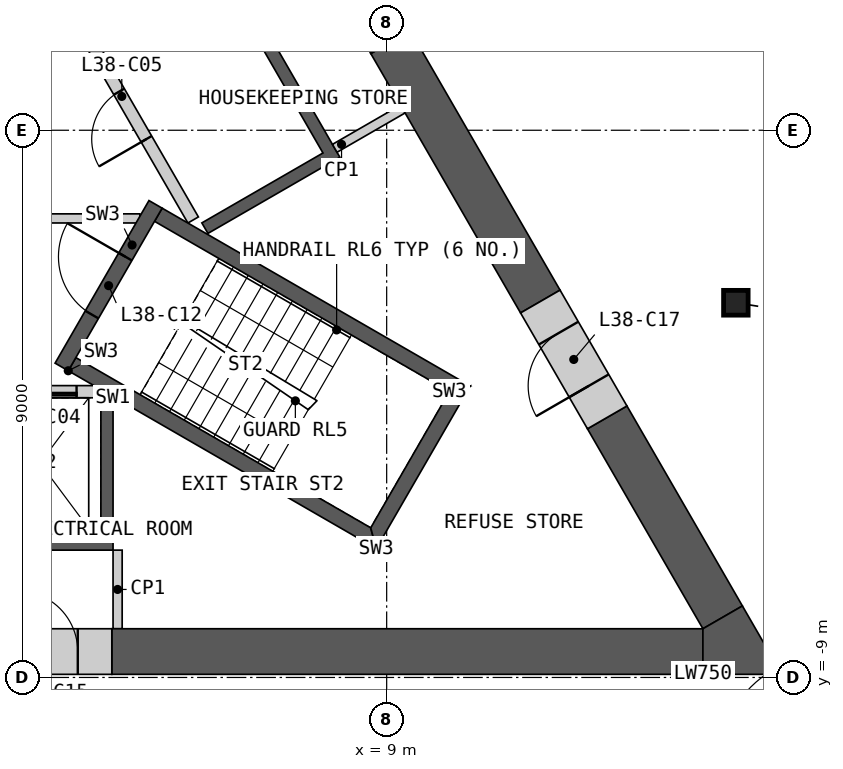
"""IFC4 building model, lengths in metres.
Left out: names, types, materials, properties, quantities, classifications, styles, units other than length and angle.
Written with IfcOpenShell. Run it as: python <this file> out.ifc"""

import sys

from ifc_helpers import new_model, si_unit, direction, frame, frame_2d, origin, origin_2d, place, context, subcontext, project, spatial, polyline, rectangle, i_section, outline, extrude, element, fill, save


model = new_model("IFC4")
c1 = context("Model", 3, precision=1e-05, world=origin(), true_north=direction((0.0, 1.0)))
c2 = subcontext(c1, "Body", "Model", "MODEL_VIEW")
j1 = project(units=[si_unit("LENGTHUNIT", "METRE"), si_unit("PLANEANGLEUNIT", "RADIAN")], contexts=[c1])
p1 = place(None, origin())
s1 = spatial("IfcSite", under=j1, at=p1, CompositionType="ELEMENT")
p2 = place(p1, origin())
s2 = spatial("IfcBuilding", under=s1, at=p2, CompositionType="ELEMENT")
p3 = place(p2, frame((0.0, 0.0, 180.0)))
s3 = spatial("IfcBuildingStorey", under=s2, at=p3, CompositionType="ELEMENT", Elevation=180.0)
p4 = place(p3, frame((14.743, -2.837, 0.0), z_axis=(0.0, 0.0, 1.0), x_axis=(1.0, 0.0, 0.0)))
e1 = element("IfcColumn", 1, at=p4, inside=s3, PredefinedType="COLUMN", context=c2, shape_type="SweptSolid", body=[
    extrude(i_section(OverallWidth=0.404, OverallDepth=0.407, WebThickness=0.027, FlangeThickness=0.044, at=origin_2d()), origin(), (0.0, 0.0, 1.0), 3.6),
])
p5 = place(p3, origin())
e2 = element("IfcWall", 2, at=p5, inside=s3, PredefinedType="SHEAR", context=c2, shape_type="SweptSolid", body=[
    extrude(outline(polyline([(4.5, -4.4), (4.5, -6.906), (2.1, -6.906), (2.1, -4.4), (2.3, -4.4), (2.3, -6.7), (4.3, -6.7), (4.3, -4.4), (4.5, -4.4)])), origin(), (0.0, 0.0, 1.0), 3.25),
])
p6 = place(p3, frame((-4.187, -4.3, 0.0), z_axis=(0.0, 0.0, 1.0), x_axis=(1.0, 0.0, 0.0)))
e3 = element("IfcWall", 3, at=p6, inside=s3, PredefinedType="SOLIDWALL", context=c2, shape_type="SweptSolid", body=[
    extrude(rectangle(XDim=8.373, YDim=0.2, at=frame_2d((4.187, 0.0))), origin(), (0.0, 0.0, 1.0), 3.25),
])
p7 = place(p6, frame((0.287, 0.0, 0.0)))
e4 = element("IfcOpeningElement", 4, at=p7, cuts=e3, PredefinedType="OPENING", context=c2, shape_type="SweptSolid", body=[
    extrude(rectangle(XDim=1.2, YDim=2.1, at=frame_2d((0.6, 1.05))), frame((0.0, 0.11, 0.0), z_axis=(0.0, -1.0, 0.0), x_axis=(1.0, 0.0, 0.0)), (0.0, 0.0, 1.0), 0.22),
])
p8 = place(p6, frame((2.387, 0.0, 0.0)))
e5 = element("IfcOpeningElement", 5, at=p8, cuts=e3, PredefinedType="OPENING", context=c2, shape_type="SweptSolid", body=[
    extrude(rectangle(XDim=1.4, YDim=2.1, at=frame_2d((0.7, 1.05))), frame((0.0, 0.11, 0.0), z_axis=(0.0, -1.0, 0.0), x_axis=(1.0, 0.0, 0.0)), (0.0, 0.0, 1.0), 0.22),
])
p9 = place(p6, frame((4.837, 0.0, 0.0)))
e6 = element("IfcOpeningElement", 6, at=p9, cuts=e3, PredefinedType="OPENING", context=c2, shape_type="SweptSolid", body=[
    extrude(rectangle(XDim=0.9, YDim=2.1, at=frame_2d((0.45, 1.05))), frame((0.0, 0.11, 0.0), z_axis=(0.0, -1.0, 0.0), x_axis=(1.0, 0.0, 0.0)), (0.0, 0.0, 1.0), 0.22),
])
p10 = place(p6, frame((6.887, 0.0, 0.0)))
e7 = element("IfcOpeningElement", 7, at=p10, cuts=e3, PredefinedType="OPENING", context=c2, shape_type="SweptSolid", body=[
    extrude(rectangle(XDim=1.2, YDim=2.1, at=frame_2d((0.6, 1.05))), frame((0.0, 0.11, 0.0), z_axis=(0.0, -1.0, 0.0), x_axis=(1.0, 0.0, 0.0)), (0.0, 0.0, 1.0), 0.22),
])
p11 = place(p3, origin())
e8 = element("IfcWall", 8, at=p11, inside=s3, PredefinedType="SHEAR", context=c2, shape_type="SweptSolid", body=[
    extrude(outline(polyline([(3.76, 2.287), (5.931, 3.54), (8.231, -0.444), (6.061, -1.697), (5.96, -1.524), (7.952, -0.374), (5.852, 3.263), (3.861, 2.113), (3.76, 2.287)])), origin(), (0.0, 0.0, 1.0), 3.25),
])
p12 = place(p3, frame((5.817, -1.476, 0.0), z_axis=(0.0, 0.0, 1.0), x_axis=(-0.500002616675, 0.866023893041, 0.0)))
e9 = element("IfcWall", 9, at=p12, inside=s3, PredefinedType="SOLIDWALL", context=c2, shape_type="SweptSolid", body=[
    extrude(rectangle(XDim=8.373, YDim=0.2, at=frame_2d((4.187, 0.0))), origin(), (0.0, 0.0, 1.0), 3.25),
])
p13 = place(p12, frame((1.537, 0.0, 0.0)))
e10 = element("IfcOpeningElement", 10, at=p13, cuts=e9, PredefinedType="OPENING", context=c2, shape_type="SweptSolid", body=[
    extrude(rectangle(XDim=0.9, YDim=2.1, at=frame_2d((0.45, 1.05))), frame((0.0, 0.11, 0.0), z_axis=(0.0, -1.0, 0.0), x_axis=(1.0, 0.0, 0.0)), (0.0, 0.0, 1.0), 0.22),
])
p14 = place(p12, frame((4.837, 0.0, 0.0)))
e11 = element("IfcOpeningElement", 11, at=p14, cuts=e9, PredefinedType="OPENING", context=c2, shape_type="SweptSolid", body=[
    extrude(rectangle(XDim=0.9, YDim=2.1, at=frame_2d((0.45, 1.05))), frame((0.0, 0.11, 0.0), z_axis=(0.0, -1.0, 0.0), x_axis=(1.0, 0.0, 0.0)), (0.0, 0.0, 1.0), 0.22),
])
p15 = place(p12, frame((6.937, 0.0, 0.0)))
e12 = element("IfcOpeningElement", 12, at=p15, cuts=e9, PredefinedType="OPENING", context=c2, shape_type="SweptSolid", body=[
    extrude(rectangle(XDim=1.1, YDim=2.1, at=frame_2d((0.55, 1.05))), frame((0.0, 0.11, 0.0), z_axis=(0.0, -1.0, 0.0), x_axis=(1.0, 0.0, 0.0)), (0.0, 0.0, 1.0), 0.22),
])
p16 = place(p3, frame((-4.941, -1.45, 0.0), z_axis=(0.0, 0.0, 1.0), x_axis=(1.0, 0.0, 0.0)))
e13 = element("IfcWall", 13, at=p16, inside=s3, PredefinedType="PARTITIONING", context=c2, shape_type="SweptSolid", body=[
    extrude(rectangle(XDim=9.882, YDim=0.15, at=frame_2d((4.941, 0.0))), origin(), (0.0, 0.0, 1.0), 3.25),
])
p17 = place(p16, frame((4.391, 0.0, 0.0)))
e14 = element("IfcOpeningElement", 14, at=p17, cuts=e13, PredefinedType="OPENING", context=c2, shape_type="SweptSolid", body=[
    extrude(rectangle(XDim=1.1, YDim=2.1, at=frame_2d((0.55, 1.05))), frame((0.0, 0.085, 0.0), z_axis=(0.0, -1.0, 0.0), x_axis=(1.0, 0.0, 0.0)), (0.0, 0.0, 1.0), 0.17),
])
p18 = place(p3, origin())
e15 = element("IfcWall", 15, at=p18, inside=s3, PredefinedType="SHEAR", context=c2, shape_type="SweptSolid", body=[
    extrude(outline(polyline([(3.763, -3.956), (8.83, -6.881), (8.738, -6.539), (3.888, -3.739), (3.763, -3.956)])), origin(), (0.0, 0.0, 1.0), 3.25),
])
p19 = place(p3, origin())
e16 = element("IfcWall", 16, at=p19, inside=s3, PredefinedType="SHEAR", context=c2, shape_type="SweptSolid", body=[
    extrude(outline(polyline([(8.83, -6.881), (10.374, -4.206), (10.032, -4.298), (8.738, -6.539), (8.83, -6.881)])), origin(), (0.0, 0.0, 1.0), 3.25),
])
p20 = place(p3, origin())
e17 = element("IfcWall", 17, at=p20, inside=s3, PredefinedType="SHEAR", context=c2, shape_type="SweptSolid", body=[
    extrude(outline(polyline([(10.032, -4.298), (10.374, -4.206), (5.307, -1.281), (5.182, -1.498), (10.032, -4.298)])), origin(), (0.0, 0.0, 1.0), 3.25),
])
p21 = place(p3, frame((3.655, -3.893, 0.0), z_axis=(0.0, 0.0, 1.0), x_axis=(0.499982516597, 0.866035497597, 0.0)))
e18 = element("IfcWall", 18, at=p21, inside=s3, PredefinedType="SHEAR", context=c2, shape_type="SweptSolid", body=[
    extrude(rectangle(XDim=3.088, YDim=0.25, at=frame_2d((1.544, 0.0))), origin(), (0.0, 0.0, 1.0), 3.25),
])
p22 = place(p21, frame((0.994, 0.0, 0.0)))
e19 = element("IfcOpeningElement", 19, at=p22, cuts=e18, PredefinedType="OPENING", context=c2, shape_type="SweptSolid", body=[
    extrude(rectangle(XDim=1.1, YDim=2.1, at=frame_2d((0.55, 1.05))), frame((0.0, 0.135, 0.0), z_axis=(0.0, -1.0, 0.0), x_axis=(1.0, 0.0, 0.0)), (0.0, 0.0, 1.0), 0.27),
])
for number, where, z_axis, x_axis in (
    (20, (4.575, -6.906, 0.0), (0.0, 0.0, 1.0), (0.0, -1.0, 0.0)),
    (21, (9.266, 0.349, 0.0), (0.0, 0.0, 1.0), (-0.866, -0.5, 0.0)),
):
    element("IfcWall", number, at=place(p3, frame(where, z_axis=z_axis, x_axis=x_axis)), inside=s3, PredefinedType="PARTITIONING", context=c2, shape_type="SweptSolid", body=[
        extrude(rectangle(XDim=1.293, YDim=0.15, at=frame_2d((0.646, 0.0))), origin(), (0.0, 0.0, 1.0), 3.25),
    ])
p23 = place(p3, frame((4.48, -8.574, 0.0), z_axis=(0.0, 0.0, 1.0), x_axis=(1.0, 0.0, 0.0)))
e22 = element("IfcWall", 22, at=p23, inside=s3, PredefinedType="SHEAR", context=c2, shape_type="SweptSolid", body=[
    extrude(rectangle(XDim=9.721, YDim=0.75, at=frame_2d((4.86, 0.0))), origin(), (0.0, 0.0, 1.0), 3.25),
])
p24 = place(p3, frame((11.527, -2.817, 0.0), z_axis=(0.0, 0.0, 1.0), x_axis=(-0.50001992892, 0.866013897511, 0.0)))
e23 = element("IfcWall", 23, at=p24, inside=s3, PredefinedType="SHEAR", context=c2, shape_type="SweptSolid", body=[
    extrude(rectangle(XDim=4.926, YDim=0.75, at=frame_2d((2.463, 0.0))), origin(), (0.0, 0.0, 1.0), 3.25),
])
p25 = place(p3, frame((14.526, -8.011, 0.0), z_axis=(0.0, 0.0, 1.0), x_axis=(-0.499996970966, 0.866027152591, 0.0)))
e24 = element("IfcWall", 24, at=p25, inside=s3, PredefinedType="SHEAR", context=c2, shape_type="SweptSolid", body=[
    extrude(rectangle(XDim=3.798, YDim=0.75, at=frame_2d((1.899, 0.0))), origin(), (0.0, 0.0, 1.0), 3.25),
])
p26 = place(p3, origin())
e25 = element("IfcWall", 25, at=p26, inside=s3, PredefinedType="SHEAR", context=c2, shape_type="SweptSolid", body=[
    extrude(outline(polyline([(14.201, -8.949), (14.201, -8.199), (14.851, -7.824), (15.5, -8.949), (14.201, -8.949)])), origin(), (0.0, 0.0, 1.0), 3.25),
])
p27 = place(p3, frame((2.32, -8.574, 0.0), z_axis=(0.0, 0.0, 1.0), x_axis=(1.0, 0.0, 0.0)))
e26 = element("IfcWall", 26, at=p27, inside=s3, PredefinedType="SHEAR", context=c2, shape_type="SweptSolid", body=[
    extrude(rectangle(XDim=2.16, YDim=0.75, at=frame_2d((1.08, 0.0))), origin(), (0.0, 0.0, 1.0), 3.25),
])
p28 = place(p27, frame((0.6, 0.0, 0.0)))
e27 = element("IfcOpeningElement", 27, at=p28, cuts=e26, PredefinedType="OPENING", context=c2, shape_type="SweptSolid", body=[
    extrude(rectangle(XDim=1.0, YDim=2.1, at=frame_2d((0.5, 1.05))), frame((0.0, 0.385, 0.0), z_axis=(0.0, -1.0, 0.0), x_axis=(1.0, 0.0, 0.0)), (0.0, 0.0, 1.0), 0.77),
])
p29 = place(p3, frame((12.627, -4.722, 0.0), z_axis=(0.0, 0.0, 1.0), x_axis=(-0.499946605688, 0.86605622881, 0.0)))
e28 = element("IfcWall", 28, at=p29, inside=s3, PredefinedType="SHEAR", context=c2, shape_type="SweptSolid", body=[
    extrude(rectangle(XDim=2.2, YDim=0.75, at=frame_2d((1.1, 0.0))), origin(), (0.0, 0.0, 1.0), 3.25),
])
p30 = place(p29, frame((0.6, 0.0, 0.0)))
e29 = element("IfcOpeningElement", 29, at=p30, cuts=e28, PredefinedType="OPENING", context=c2, shape_type="SweptSolid", body=[
    extrude(rectangle(XDim=1.0, YDim=2.1, at=frame_2d((0.5, 1.05))), frame((0.0, 0.385, 0.0), z_axis=(0.0, -1.0, 0.0), x_axis=(1.0, 0.0, 0.0)), (0.0, 0.0, 1.0), 0.77),
])
p31 = place(p3, frame((9.064, 1.448, 0.0), z_axis=(0.0, 0.0, 1.0), x_axis=(-0.50002983664, 0.866008176907, 0.0)))
e30 = element("IfcWall", 30, at=p31, inside=s3, PredefinedType="SHEAR", context=c2, shape_type="SweptSolid", body=[
    extrude(rectangle(XDim=2.2, YDim=0.75, at=frame_2d((1.1, 0.0))), origin(), (0.0, 0.0, 1.0), 3.25),
])
p32 = place(p31, frame((0.6, 0.0, 0.0)))
e31 = element("IfcOpeningElement", 31, at=p32, cuts=e30, PredefinedType="OPENING", context=c2, shape_type="SweptSolid", body=[
    extrude(rectangle(XDim=1.0, YDim=2.1, at=frame_2d((0.5, 1.05))), frame((0.0, 0.385, 0.0), z_axis=(0.0, -1.0, 0.0), x_axis=(1.0, 0.0, 0.0)), (0.0, 0.0, 1.0), 0.77),
])
p33 = place(p3, frame((5.377, 19.385, 0.0), z_axis=(0.0, 0.0, 1.0), x_axis=(0.500000757641, -0.86602496636, 0.0)))
e32 = element("IfcWall", 32, at=p33, inside=s3, PredefinedType="PARTITIONING", context=c2, shape_type="SweptSolid", body=[
    extrude(rectangle(XDim=28.198, YDim=0.2, at=frame_2d((14.099, 0.0))), origin(), (0.0, 0.0, 1.0), 3.25),
])
p34 = place(p33, frame((22.735, 0.0, 0.0)))
e33 = element("IfcOpeningElement", 33, at=p34, cuts=e32, PredefinedType="OPENING", context=c2, shape_type="SweptSolid", body=[
    extrude(rectangle(XDim=1.8, YDim=2.1, at=frame_2d((0.9, 1.05))), frame((0.0, 0.11, 0.0), z_axis=(0.0, -1.0, 0.0), x_axis=(1.0, 0.0, 0.0)), (0.0, 0.0, 1.0), 0.22),
])
p35 = place(p33, frame((14.402, 0.0, 0.0)))
e34 = element("IfcOpeningElement", 34, at=p35, cuts=e32, PredefinedType="OPENING", context=c2, shape_type="SweptSolid", body=[
    extrude(rectangle(XDim=1.0, YDim=2.1, at=frame_2d((0.5, 1.05))), frame((0.0, 0.11, 0.0), z_axis=(0.0, -1.0, 0.0), x_axis=(1.0, 0.0, 0.0)), (0.0, 0.0, 1.0), 0.22),
])
p36 = place(p33, frame((12.796, 0.0, 0.0)))
e35 = element("IfcOpeningElement", 35, at=p36, cuts=e32, PredefinedType="OPENING", context=c2, shape_type="SweptSolid", body=[
    extrude(rectangle(XDim=1.0, YDim=2.1, at=frame_2d((0.5, 1.05))), frame((0.0, 0.11, 0.0), z_axis=(0.0, -1.0, 0.0), x_axis=(1.0, 0.0, 0.0)), (0.0, 0.0, 1.0), 0.22),
])
p37 = place(p33, frame((4.164, 0.0, 0.0)))
e36 = element("IfcOpeningElement", 36, at=p37, cuts=e32, PredefinedType="OPENING", context=c2, shape_type="SweptSolid", body=[
    extrude(rectangle(XDim=1.0, YDim=2.1, at=frame_2d((0.5, 1.05))), frame((0.0, 0.11, 0.0), z_axis=(0.0, -1.0, 0.0), x_axis=(1.0, 0.0, 0.0)), (0.0, 0.0, 1.0), 0.22),
])
p38 = place(p33, frame((1.452, 0.0, 0.0)))
e37 = element("IfcOpeningElement", 37, at=p38, cuts=e32, PredefinedType="OPENING", context=c2, shape_type="SweptSolid", body=[
    extrude(rectangle(XDim=0.95, YDim=2.1, at=frame_2d((0.475, 1.05))), frame((0.0, 0.11, 0.0), z_axis=(0.0, -1.0, 0.0), x_axis=(1.0, 0.0, 0.0)), (0.0, 0.0, 1.0), 0.22),
])
p39 = place(p10, origin())
e38 = element("IfcDoor", 38, at=p39, inside=s3, OperationType="SLIDING_TO_LEFT", PredefinedType="DOOR", context=c2, shape_type="SweptSolid", body=[
    extrude(rectangle(XDim=1.2, YDim=2.1, at=frame_2d((0.6, 1.05))), frame((0.0, 0.025, 0.0), z_axis=(0.0, -1.0, 0.0), x_axis=(1.0, 0.0, 0.0)), (0.0, 0.0, 1.0), 0.05),
])
fill(e7, e38)
p40 = place(p13, origin())
e39 = element("IfcDoor", 39, at=p40, inside=s3, OperationType="SINGLE_SWING_LEFT", PredefinedType="DOOR", context=c2, shape_type="SweptSolid", body=[
    extrude(rectangle(XDim=0.9, YDim=2.1, at=frame_2d((0.45, 1.05))), frame((0.0, 0.025, 0.0), z_axis=(0.0, -1.0, 0.0), x_axis=(1.0, 0.0, 0.0)), (0.0, 0.0, 1.0), 0.05),
])
fill(e10, e39)
p41 = place(p22, origin())
e40 = element("IfcDoor", 40, at=p41, inside=s3, OperationType="SINGLE_SWING_RIGHT", PredefinedType="DOOR", context=c2, shape_type="SweptSolid", body=[
    extrude(rectangle(XDim=1.1, YDim=2.1, at=frame_2d((0.55, 1.05))), frame((0.0, 0.025, 0.0), z_axis=(0.0, -1.0, 0.0), x_axis=(1.0, 0.0, 0.0)), (0.0, 0.0, 1.0), 0.05),
])
fill(e19, e40)
p42 = place(p28, origin())
e41 = element("IfcDoor", 41, at=p42, inside=s3, OperationType="SINGLE_SWING_LEFT", PredefinedType="DOOR", context=c2, shape_type="SweptSolid", body=[
    extrude(rectangle(XDim=1.0, YDim=2.1, at=frame_2d((0.5, 1.05))), frame((0.0, 0.13, 0.0), z_axis=(0.0, -1.0, 0.0), x_axis=(1.0, 0.0, 0.0)), (0.0, 0.0, 1.0), 0.05),
])
fill(e27, e41)
p43 = place(p30, origin())
e42 = element("IfcDoor", 42, at=p43, inside=s3, OperationType="SINGLE_SWING_LEFT", PredefinedType="DOOR", context=c2, shape_type="SweptSolid", body=[
    extrude(rectangle(XDim=1.0, YDim=2.1, at=frame_2d((0.5, 1.05))), frame((0.0, 0.13, 0.0), z_axis=(0.0, -1.0, 0.0), x_axis=(1.0, 0.0, 0.0)), (0.0, 0.0, 1.0), 0.05),
])
fill(e29, e42)
save(model, sys.argv[1])
